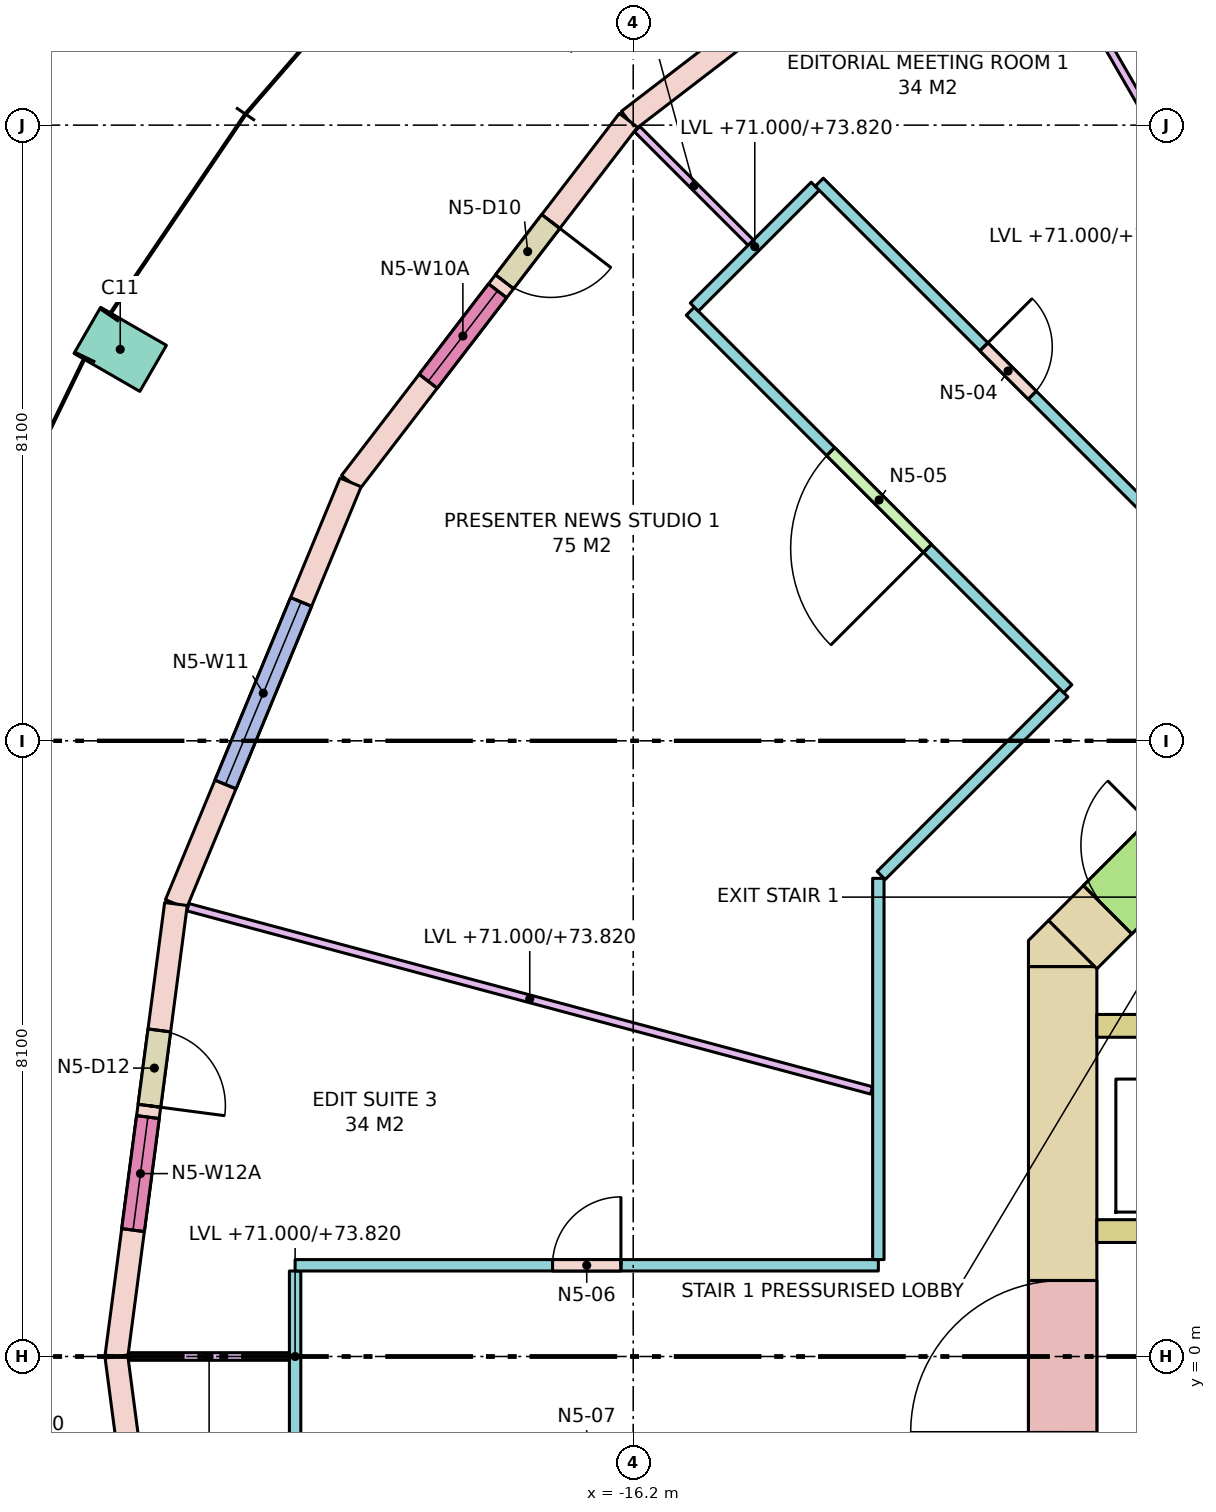
"""IFC4 building model, lengths in metres.
Left out: names, types, materials, properties, quantities, classifications, styles, units other than length and angle.
Written with IfcOpenShell. Run it as: python <this file> out.ifc"""

import sys

from ifc_helpers import new_model, si_unit, direction, frame, frame_2d, origin, origin_2d, place, context, subcontext, project, spatial, polyline, rectangle, outline, extrude, element, fill, save


model = new_model("IFC4")
c1 = context("Model", 3, precision=1e-05, world=origin(), true_north=direction((0.0, 1.0)))
c2 = subcontext(c1, "Body", "Model", "MODEL_VIEW")
j1 = project(units=[si_unit("LENGTHUNIT", "METRE"), si_unit("PLANEANGLEUNIT", "RADIAN")], contexts=[c1])
p1 = place(None, origin())
s1 = spatial("IfcSite", under=j1, at=p1, CompositionType="ELEMENT")
p2 = place(p1, origin())
s2 = spatial("IfcBuilding", under=s1, at=p2, CompositionType="ELEMENT")
p3 = place(p2, frame((0.0, 0.0, 71.0)))
s3 = spatial("IfcBuildingStorey", under=s2, at=p3, CompositionType="ELEMENT", Elevation=71.0)
p4 = place(p3, frame((-22.95, 13.25, 0.0), z_axis=(0.0, 0.0, 1.0), x_axis=(-0.5, -0.866025403784, 0.0)))
e1 = element("IfcColumn", 1, at=p4, inside=s3, PredefinedType="COLUMN", context=c2, shape_type="SweptSolid", body=[
    extrude(rectangle(XDim=0.7, YDim=1.0, at=origin_2d()), origin(), (0.0, 0.0, 1.0), 4.0),
])
p5 = place(p3, frame((-10.55, -5.13, -0.28), z_axis=(0.0, 0.0, 1.0), x_axis=(0.0, 1.0, 0.0)))
e2 = element("IfcWall", 2, at=p5, inside=s3, PredefinedType="SHEAR", context=c2, shape_type="SweptSolid", body=[
    extrude(rectangle(XDim=10.26, YDim=0.9, at=frame_2d((5.13, 0.0))), origin(), (0.0, 0.0, 1.0), 4.0),
])
p6 = place(p5, frame((4.13, 0.0, 0.28)))
e3 = element("IfcOpeningElement", 3, at=p6, cuts=e2, PredefinedType="OPENING", context=c2, shape_type="SweptSolid", body=[
    extrude(rectangle(XDim=2.0, YDim=2.1, at=frame_2d((1.0, 1.05))), frame((0.0, 0.46, 0.0), z_axis=(0.0, -1.0, 0.0), x_axis=(1.0, 0.0, 0.0)), (0.0, 0.0, 1.0), 0.92),
])
p7 = place(p3, frame((-10.418, 5.418, -0.28), z_axis=(0.0, 0.0, 1.0), x_axis=(0.707106781187, 0.707106781187, 0.0)))
e4 = element("IfcWall", 4, at=p7, inside=s3, PredefinedType="SHEAR", context=c2, shape_type="SweptSolid", body=[
    extrude(rectangle(XDim=4.243, YDim=0.9, at=frame_2d((2.121, 0.0))), origin(), (0.0, 0.0, 1.0), 4.0),
])
p8 = place(p7, frame((0.65, 0.0, 0.28)))
e5 = element("IfcOpeningElement", 5, at=p8, cuts=e4, PredefinedType="OPENING", context=c2, shape_type="SweptSolid", body=[
    extrude(rectangle(XDim=1.2, YDim=2.1, at=frame_2d((0.6, 1.05))), frame((0.0, 0.46, 0.0), z_axis=(0.0, -1.0, 0.0), x_axis=(1.0, 0.0, 0.0)), (0.0, 0.0, 1.0), 0.92),
])
p9 = place(p3, frame((0.0, 0.0, -0.28)))
e6 = element("IfcWall", 6, at=p9, inside=s3, PredefinedType="SHEAR", context=c2, shape_type="SweptSolid", body=[
    extrude(outline(polyline([(-10.736, 5.736), (-10.13, 5.13), (-11.0, 5.13), (-11.0, 5.473), (-10.736, 5.736)])), origin(), (0.0, 0.0, 1.0), 4.0),
])
p10 = place(p3, frame((-10.1, 4.35, 0.0), z_axis=(0.0, 0.0, 1.0), x_axis=(1.0, 0.0, 0.0)))
e7 = element("IfcWall", 7, at=p10, inside=s3, PredefinedType="SOLIDWALL", context=c2, shape_type="SweptSolid", body=[
    extrude(rectangle(XDim=8.1, YDim=0.3, at=frame_2d((4.05, 0.0))), origin(), (0.0, 0.0, 1.0), 3.72),
])
p11 = place(p3, frame((-10.1, 1.65, 0.0), z_axis=(0.0, 0.0, 1.0), x_axis=(1.0, 0.0, 0.0)))
e8 = element("IfcWall", 8, at=p11, inside=s3, PredefinedType="SOLIDWALL", context=c2, shape_type="SweptSolid", body=[
    extrude(rectangle(XDim=8.1, YDim=0.3, at=frame_2d((4.05, 0.0))), origin(), (0.0, 0.0, 1.0), 3.72),
])
p12 = place(p11, frame((0.7, 0.0, 0.0)))
e9 = element("IfcOpeningElement", 9, at=p12, cuts=e8, PredefinedType="OPENING", context=c2, shape_type="SweptSolid", body=[
    extrude(rectangle(XDim=1.1, YDim=2.1, at=frame_2d((0.55, 1.05))), frame((0.0, 0.16, 0.0), z_axis=(0.0, -1.0, 0.0), x_axis=(1.0, 0.0, 0.0)), (0.0, 0.0, 1.0), 0.32),
])
p13 = place(p11, frame((3.5, 0.0, 0.0)))
e10 = element("IfcOpeningElement", 10, at=p13, cuts=e8, PredefinedType="OPENING", context=c2, shape_type="SweptSolid", body=[
    extrude(rectangle(XDim=1.1, YDim=2.1, at=frame_2d((0.55, 1.05))), frame((0.0, 0.16, 0.0), z_axis=(0.0, -1.0, 0.0), x_axis=(1.0, 0.0, 0.0)), (0.0, 0.0, 1.0), 0.32),
])
p14 = place(p11, frame((6.15, 0.0, 0.0)))
e11 = element("IfcOpeningElement", 11, at=p14, cuts=e8, PredefinedType="OPENING", context=c2, shape_type="SweptSolid", body=[
    extrude(rectangle(XDim=1.1, YDim=2.1, at=frame_2d((0.55, 1.05))), frame((0.0, 0.16, 0.0), z_axis=(0.0, -1.0, 0.0), x_axis=(1.0, 0.0, 0.0)), (0.0, 0.0, 1.0), 0.32),
])
p15 = place(p3, frame((-11.5, 19.919, 0.0), z_axis=(0.0, 0.0, 1.0), x_axis=(-0.793339924758, -0.608778912074, 0.0)))
e12 = element("IfcWall", 12, at=p15, inside=s3, PredefinedType="STANDARD", context=c2, shape_type="SweptSolid", body=[
    extrude(rectangle(XDim=6.004, YDim=0.3, at=frame_2d((3.002, 0.0))), origin(), (0.0, 0.0, 1.0), 3.72),
])
p16 = place(p15, frame((1.702, 0.0, 0.8)))
e13 = element("IfcOpeningElement", 13, at=p16, cuts=e12, PredefinedType="OPENING", context=c2, shape_type="SweptSolid", body=[
    extrude(rectangle(XDim=2.6, YDim=2.7, at=frame_2d((1.3, 1.35))), frame((0.0, 0.16, 0.0), z_axis=(0.0, -1.0, 0.0), x_axis=(1.0, 0.0, 0.0)), (0.0, 0.0, 1.0), 0.32),
])
p17 = place(p3, frame((-16.263, 16.263, 0.0), z_axis=(0.0, 0.0, 1.0), x_axis=(-0.608778912074, -0.793339924758, 0.0)))
e14 = element("IfcWall", 14, at=p17, inside=s3, PredefinedType="STANDARD", context=c2, shape_type="SweptSolid", body=[
    extrude(rectangle(XDim=6.004, YDim=0.3, at=frame_2d((3.002, 0.0))), origin(), (0.0, 0.0, 1.0), 3.72),
])
p18 = place(p17, frame((1.677, 0.0, 0.0)))
e15 = element("IfcOpeningElement", 15, at=p18, cuts=e14, PredefinedType="OPENING", context=c2, shape_type="SweptSolid", body=[
    extrude(rectangle(XDim=1.0, YDim=2.4, at=frame_2d((0.5, 1.2))), frame((0.0, 0.16, 0.0), z_axis=(0.0, -1.0, 0.0), x_axis=(1.0, 0.0, 0.0)), (0.0, 0.0, 1.0), 0.32),
])
p19 = place(p17, frame((2.827, 0.0, 0.8)))
e16 = element("IfcOpeningElement", 16, at=p19, cuts=e14, PredefinedType="OPENING", context=c2, shape_type="SweptSolid", body=[
    extrude(rectangle(XDim=1.5, YDim=2.7, at=frame_2d((0.75, 1.35))), frame((0.0, 0.16, 0.0), z_axis=(0.0, -1.0, 0.0), x_axis=(1.0, 0.0, 0.0)), (0.0, 0.0, 1.0), 0.32),
])
p20 = place(p3, frame((-19.919, 11.5, 0.0), z_axis=(0.0, 0.0, 1.0), x_axis=(-0.382671411433, -0.923884511653, 0.0)))
e17 = element("IfcWall", 17, at=p20, inside=s3, PredefinedType="STANDARD", context=c2, shape_type="SweptSolid", body=[
    extrude(rectangle(XDim=6.004, YDim=0.3, at=frame_2d((3.002, 0.0))), origin(), (0.0, 0.0, 1.0), 3.72),
])
p21 = place(p20, frame((1.702, 0.0, 0.8)))
e18 = element("IfcOpeningElement", 18, at=p21, cuts=e17, PredefinedType="OPENING", context=c2, shape_type="SweptSolid", body=[
    extrude(rectangle(XDim=2.6, YDim=2.7, at=frame_2d((1.3, 1.35))), frame((0.0, 0.16, 0.0), z_axis=(0.0, -1.0, 0.0), x_axis=(1.0, 0.0, 0.0)), (0.0, 0.0, 1.0), 0.32),
])
p22 = place(p3, frame((-22.216, 5.953, 0.0), z_axis=(0.0, 0.0, 1.0), x_axis=(-0.130522880875, -0.991445297315, 0.0)))
e19 = element("IfcWall", 19, at=p22, inside=s3, PredefinedType="STANDARD", context=c2, shape_type="SweptSolid", body=[
    extrude(rectangle(XDim=6.004, YDim=0.3, at=frame_2d((3.002, 0.0))), origin(), (0.0, 0.0, 1.0), 3.72),
])
p23 = place(p22, frame((1.677, 0.0, 0.0)))
e20 = element("IfcOpeningElement", 20, at=p23, cuts=e19, PredefinedType="OPENING", context=c2, shape_type="SweptSolid", body=[
    extrude(rectangle(XDim=1.0, YDim=2.4, at=frame_2d((0.5, 1.2))), frame((0.0, 0.16, 0.0), z_axis=(0.0, -1.0, 0.0), x_axis=(1.0, 0.0, 0.0)), (0.0, 0.0, 1.0), 0.32),
])
p24 = place(p22, frame((2.827, 0.0, 0.8)))
e21 = element("IfcOpeningElement", 21, at=p24, cuts=e19, PredefinedType="OPENING", context=c2, shape_type="SweptSolid", body=[
    extrude(rectangle(XDim=1.5, YDim=2.7, at=frame_2d((0.75, 1.35))), frame((0.0, 0.16, 0.0), z_axis=(0.0, -1.0, 0.0), x_axis=(1.0, 0.0, 0.0)), (0.0, 0.0, 1.0), 0.32),
])
p25 = place(p3, frame((-23.0, 0.0, 0.0), z_axis=(0.0, 0.0, 1.0), x_axis=(0.130522880875, -0.991445297315, 0.0)))
e22 = element("IfcWall", 22, at=p25, inside=s3, PredefinedType="STANDARD", context=c2, shape_type="SweptSolid", body=[
    extrude(rectangle(XDim=6.004, YDim=0.3, at=frame_2d((3.002, 0.0))), origin(), (0.0, 0.0, 1.0), 3.72),
])
p26 = place(p25, frame((1.702, 0.0, 0.8)))
e23 = element("IfcOpeningElement", 23, at=p26, cuts=e22, PredefinedType="OPENING", context=c2, shape_type="SweptSolid", body=[
    extrude(rectangle(XDim=2.6, YDim=2.7, at=frame_2d((1.3, 1.35))), frame((0.0, 0.16, 0.0), z_axis=(0.0, -1.0, 0.0), x_axis=(1.0, 0.0, 0.0)), (0.0, 0.0, 1.0), 0.32),
])
p27 = place(p3, frame((-20.649, -1.125, 0.0), z_axis=(0.0, 0.0, 1.0), x_axis=(0.0, 1.0, 0.0)))
e24 = element("IfcWall", 24, at=p27, inside=s3, PredefinedType="PARTITIONING", context=c2, shape_type="SweptSolid", body=[
    extrude(rectangle(XDim=2.25, YDim=0.15, at=frame_2d((1.125, 0.0))), origin(), (0.0, 0.0, 1.0), 2.82),
])
p28 = place(p3, frame((-20.649, 1.2, 0.0), z_axis=(0.0, 0.0, 1.0), x_axis=(1.0, 0.0, 0.0)))
e25 = element("IfcWall", 25, at=p28, inside=s3, PredefinedType="PARTITIONING", context=c2, shape_type="SweptSolid", body=[
    extrude(rectangle(XDim=7.674, YDim=0.15, at=frame_2d((3.837, 0.0))), origin(), (0.0, 0.0, 1.0), 3.72),
])
p29 = place(p28, frame((3.387, 0.0, 0.0)))
e26 = element("IfcOpeningElement", 26, at=p29, cuts=e25, PredefinedType="OPENING", context=c2, shape_type="SweptSolid", body=[
    extrude(rectangle(XDim=0.9, YDim=2.1, at=frame_2d((0.45, 1.05))), frame((0.0, 0.085, 0.0), z_axis=(0.0, -1.0, 0.0), x_axis=(1.0, 0.0, 0.0)), (0.0, 0.0, 1.0), 0.17),
])
p30 = place(p3, frame((-12.975, 1.275, 0.0), z_axis=(0.0, 0.0, 1.0), x_axis=(0.0, 1.0, 0.0)))
e27 = element("IfcWall", 27, at=p30, inside=s3, PredefinedType="PARTITIONING", context=c2, shape_type="SweptSolid", body=[
    extrude(rectangle(XDim=5.016, YDim=0.15, at=frame_2d((2.508, 0.0))), origin(), (0.0, 0.0, 1.0), 2.82),
])
p31 = place(p3, frame((-12.938, 6.328, 0.0), z_axis=(0.0, 0.0, 1.0), x_axis=(0.707106781187, 0.707106781187, 0.0)))
e28 = element("IfcWall", 28, at=p31, inside=s3, PredefinedType="PARTITIONING", context=c2, shape_type="SweptSolid", body=[
    extrude(rectangle(XDim=3.399, YDim=0.15, at=frame_2d((1.7, 0.0))), origin(), (0.0, 0.0, 1.0), 2.82),
])
p32 = place(p3, frame((-10.481, 8.784, 0.0), z_axis=(0.0, 0.0, 1.0), x_axis=(-0.707124155885, 0.707089406061, 0.0)))
e29 = element("IfcWall", 29, at=p32, inside=s3, PredefinedType="PARTITIONING", context=c2, shape_type="SweptSolid", body=[
    extrude(rectangle(XDim=7.026, YDim=0.15, at=frame_2d((3.513, 0.0))), origin(), (0.0, 0.0, 1.0), 3.72),
])
p33 = place(p32, frame((2.613, 0.0, 0.0)))
e30 = element("IfcOpeningElement", 30, at=p33, cuts=e29, PredefinedType="OPENING", context=c2, shape_type="SweptSolid", body=[
    extrude(rectangle(XDim=1.8, YDim=2.1, at=frame_2d((0.9, 1.05))), frame((0.0, 0.085, 0.0), z_axis=(0.0, -1.0, 0.0), x_axis=(1.0, 0.0, 0.0)), (0.0, 0.0, 1.0), 0.17),
])
p34 = place(p3, frame((-15.396, 13.805, 0.0), z_axis=(0.0, 0.0, 1.0), x_axis=(0.707106781187, 0.707106781187, 0.0)))
e31 = element("IfcWall", 31, at=p34, inside=s3, PredefinedType="PARTITIONING", context=c2, shape_type="SweptSolid", body=[
    extrude(rectangle(XDim=2.25, YDim=0.15, at=frame_2d((1.125, 0.0))), origin(), (0.0, 0.0, 1.0), 2.82),
])
p35 = place(p3, frame((-13.752, 15.449, 0.0), z_axis=(0.0, 0.0, 1.0), x_axis=(0.707089406061, -0.707124155885, 0.0)))
e32 = element("IfcWall", 32, at=p35, inside=s3, PredefinedType="PARTITIONING", context=c2, shape_type="SweptSolid", body=[
    extrude(rectangle(XDim=7.026, YDim=0.15, at=frame_2d((3.513, 0.0))), origin(), (0.0, 0.0, 1.0), 3.72),
])
p36 = place(p35, frame((3.063, 0.0, 0.0)))
e33 = element("IfcOpeningElement", 33, at=p36, cuts=e32, PredefinedType="OPENING", context=c2, shape_type="SweptSolid", body=[
    extrude(rectangle(XDim=0.9, YDim=2.1, at=frame_2d((0.45, 1.05))), frame((0.0, 0.085, 0.0), z_axis=(0.0, -1.0, 0.0), x_axis=(1.0, 0.0, 0.0)), (0.0, 0.0, 1.0), 0.17),
])
p37 = place(p3, frame((-6.394, 11.075, 0.0), z_axis=(0.0, 0.0, 1.0), x_axis=(-0.500024592647, 0.866011204747, 0.0)))
e34 = element("IfcWall", 34, at=p37, inside=s3, PredefinedType="PARTITIONING", context=c2, shape_type="SweptSolid", body=[
    extrude(rectangle(XDim=10.049, YDim=0.1, at=frame_2d((5.024, 0.0))), origin(), (0.0, 0.0, 1.0), 2.82),
])
p38 = place(p3, frame((-14.654, 14.654, 0.0), z_axis=(0.0, 0.0, 1.0), x_axis=(-0.707106781187, 0.707106781187, 0.0)))
e35 = element("IfcWall", 35, at=p38, inside=s3, PredefinedType="PARTITIONING", context=c2, shape_type="SweptSolid", body=[
    extrude(rectangle(XDim=2.113, YDim=0.1, at=frame_2d((1.057, 0.0))), origin(), (0.0, 0.0, 1.0), 2.82),
])
p39 = place(p3, frame((-13.064, 3.5, 0.0), z_axis=(0.0, 0.0, 1.0), x_axis=(-0.965922655056, 0.258830880017, 0.0)))
e36 = element("IfcWall", 36, at=p39, inside=s3, PredefinedType="PARTITIONING", context=c2, shape_type="SweptSolid", body=[
    extrude(rectangle(XDim=9.312, YDim=0.1, at=frame_2d((4.656, 0.0))), origin(), (0.0, 0.0, 1.0), 2.82),
])
p40 = place(p3, frame((-20.724, 0.0, 0.0), z_axis=(0.0, 0.0, 1.0), x_axis=(-1.0, 0.0, 0.0)))
e37 = element("IfcWall", 37, at=p40, inside=s3, PredefinedType="PARTITIONING", context=c2, shape_type="SweptSolid", body=[
    extrude(rectangle(XDim=2.113, YDim=0.1, at=frame_2d((1.057, 0.0))), origin(), (0.0, 0.0, 1.0), 2.82),
])
p41 = place(p18, origin())
e38 = element("IfcDoor", 38, at=p41, inside=s3, OperationType="SINGLE_SWING_LEFT", PredefinedType="DOOR", context=c2, shape_type="SweptSolid", body=[
    extrude(rectangle(XDim=1.0, YDim=2.4, at=frame_2d((0.5, 1.2))), frame((0.0, 0.025, 0.0), z_axis=(0.0, -1.0, 0.0), x_axis=(1.0, 0.0, 0.0)), (0.0, 0.0, 1.0), 0.05),
])
fill(e15, e38)
p42 = place(p19, origin())
e39 = element("IfcWindow", 39, at=p42, inside=s3, PartitioningType="SINGLE_PANEL", PredefinedType="WINDOW", context=c2, shape_type="SweptSolid", body=[
    extrude(rectangle(XDim=1.5, YDim=2.7, at=frame_2d((0.75, 1.35))), frame((0.0, 0.03, 0.0), z_axis=(0.0, -1.0, 0.0), x_axis=(1.0, 0.0, 0.0)), (0.0, 0.0, 1.0), 0.06),
])
fill(e16, e39)
p43 = place(p21, origin())
e40 = element("IfcWindow", 40, at=p43, inside=s3, PartitioningType="SINGLE_PANEL", PredefinedType="WINDOW", context=c2, shape_type="SweptSolid", body=[
    extrude(rectangle(XDim=2.6, YDim=2.7, at=frame_2d((1.3, 1.35))), frame((0.0, 0.03, 0.0), z_axis=(0.0, -1.0, 0.0), x_axis=(1.0, 0.0, 0.0)), (0.0, 0.0, 1.0), 0.06),
])
fill(e18, e40)
p44 = place(p23, origin())
e41 = element("IfcDoor", 41, at=p44, inside=s3, OperationType="SINGLE_SWING_RIGHT", PredefinedType="DOOR", context=c2, shape_type="SweptSolid", body=[
    extrude(rectangle(XDim=1.0, YDim=2.4, at=frame_2d((0.5, 1.2))), frame((0.0, 0.025, 0.0), z_axis=(0.0, -1.0, 0.0), x_axis=(1.0, 0.0, 0.0)), (0.0, 0.0, 1.0), 0.05),
])
fill(e20, e41)
p45 = place(p24, origin())
e42 = element("IfcWindow", 42, at=p45, inside=s3, PartitioningType="SINGLE_PANEL", PredefinedType="WINDOW", context=c2, shape_type="SweptSolid", body=[
    extrude(rectangle(XDim=1.5, YDim=2.7, at=frame_2d((0.75, 1.35))), frame((0.0, 0.03, 0.0), z_axis=(0.0, -1.0, 0.0), x_axis=(1.0, 0.0, 0.0)), (0.0, 0.0, 1.0), 0.06),
])
fill(e21, e42)
p46 = place(p8, origin())
e43 = element("IfcDoor", 43, at=p46, inside=s3, OperationType="SINGLE_SWING_RIGHT", PredefinedType="DOOR", context=c2, shape_type="SweptSolid", body=[
    extrude(rectangle(XDim=1.2, YDim=2.1, at=frame_2d((0.6, 1.05))), frame((0.0, 0.025, 0.0), z_axis=(0.0, -1.0, 0.0), x_axis=(1.0, 0.0, 0.0)), (0.0, 0.0, 1.0), 0.05),
])
fill(e5, e43)
p47 = place(p6, origin())
e44 = element("IfcDoor", 44, at=p47, inside=s3, OperationType="DOUBLE_DOOR_SINGLE_SWING", PredefinedType="DOOR", context=c2, shape_type="SweptSolid", body=[
    extrude(rectangle(XDim=2.0, YDim=2.1, at=frame_2d((1.0, 1.05))), frame((0.0, 0.025, 0.0), z_axis=(0.0, -1.0, 0.0), x_axis=(1.0, 0.0, 0.0)), (0.0, 0.0, 1.0), 0.05),
])
fill(e3, e44)
p48 = place(p36, origin())
e45 = element("IfcDoor", 45, at=p48, inside=s3, OperationType="SINGLE_SWING_LEFT", PredefinedType="DOOR", context=c2, shape_type="SweptSolid", body=[
    extrude(rectangle(XDim=0.9, YDim=2.1, at=frame_2d((0.45, 1.05))), frame((0.0, 0.025, 0.0), z_axis=(0.0, -1.0, 0.0), x_axis=(1.0, 0.0, 0.0)), (0.0, 0.0, 1.0), 0.05),
])
fill(e33, e45)
p49 = place(p33, origin())
e46 = element("IfcDoor", 46, at=p49, inside=s3, OperationType="DOUBLE_DOOR_SINGLE_SWING", PredefinedType="DOOR", context=c2, shape_type="SweptSolid", body=[
    extrude(rectangle(XDim=1.8, YDim=2.1, at=frame_2d((0.9, 1.05))), frame((0.0, 0.025, 0.0), z_axis=(0.0, -1.0, 0.0), x_axis=(1.0, 0.0, 0.0)), (0.0, 0.0, 1.0), 0.05),
])
fill(e30, e46)
p50 = place(p29, origin())
e47 = element("IfcDoor", 47, at=p50, inside=s3, OperationType="SINGLE_SWING_RIGHT", PredefinedType="DOOR", context=c2, shape_type="SweptSolid", body=[
    extrude(rectangle(XDim=0.9, YDim=2.1, at=frame_2d((0.45, 1.05))), frame((0.0, 0.025, 0.0), z_axis=(0.0, -1.0, 0.0), x_axis=(1.0, 0.0, 0.0)), (0.0, 0.0, 1.0), 0.05),
])
fill(e26, e47)
save(model, sys.argv[1])
